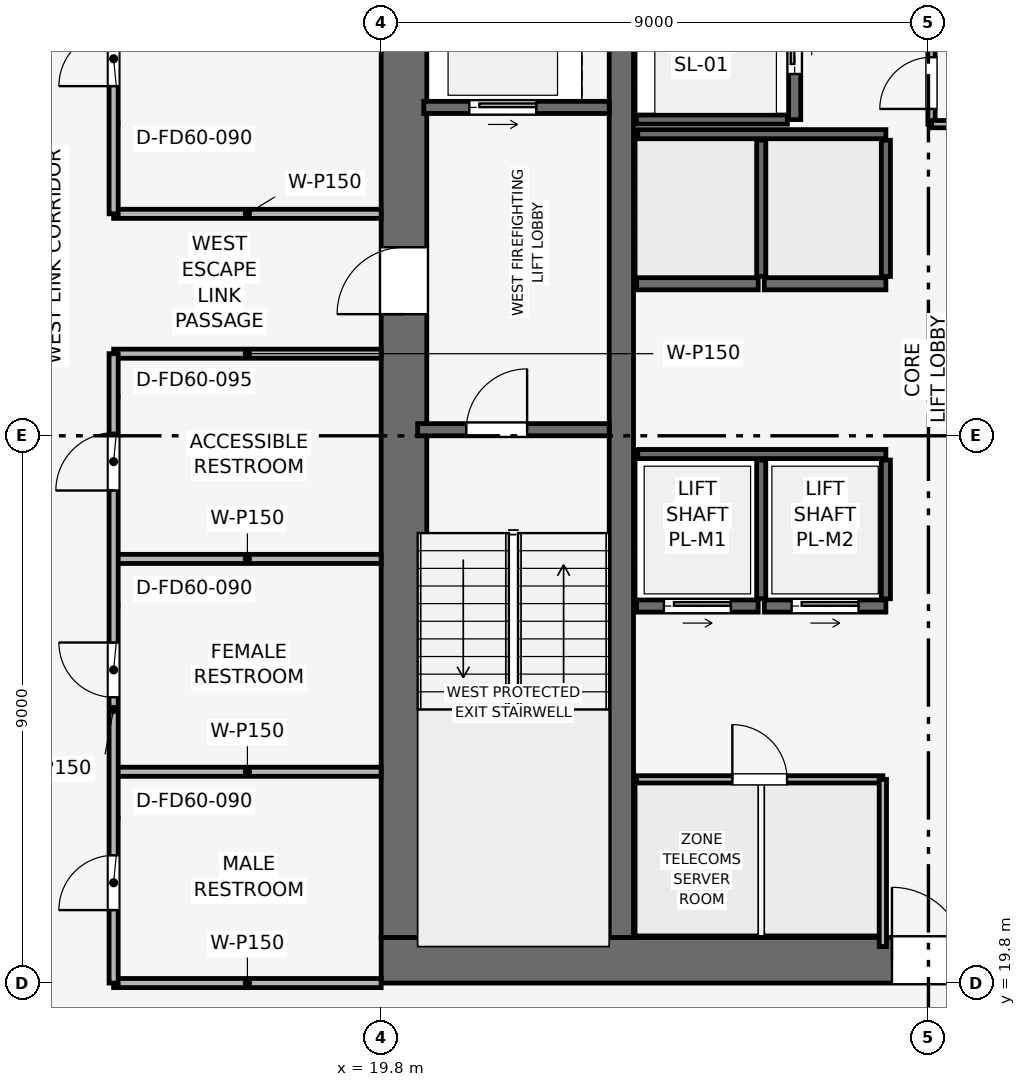
"""IFC4 building model, lengths in metres.
Left out: names, types, materials, properties, quantities, classifications, styles, units other than length and angle.
Written with IfcOpenShell. Run it as: python <this file> out.ifc"""

import sys

from ifc_helpers import new_model, si_unit, direction, frame, frame_2d, origin, place, context, subcontext, project, spatial, rectangle, extrude, element, fill, save


model = new_model("IFC4")
c1 = context("Model", 3, precision=1e-05, world=origin(), true_north=direction((0.0, 1.0)))
c2 = subcontext(c1, "Body", "Model", "MODEL_VIEW")
j1 = project(units=[si_unit("LENGTHUNIT", "METRE"), si_unit("PLANEANGLEUNIT", "RADIAN")], contexts=[c1])
p1 = place(None, origin())
s1 = spatial("IfcSite", under=j1, at=p1, CompositionType="ELEMENT")
p2 = place(p1, origin())
s2 = spatial("IfcBuilding", under=s1, at=p2, CompositionType="ELEMENT")
p3 = place(p2, frame((0.0, 0.0, 211.2)))
s3 = spatial("IfcBuildingStorey", under=s2, at=p3, CompositionType="ELEMENT", Elevation=211.2)
p4 = place(p3, frame((19.8, 20.175, 0.0), z_axis=(0.0, 0.0, 1.0), x_axis=(1.0, 0.0, 0.0)))
e1 = element("IfcWall", 1, at=p4, inside=s3, PredefinedType="SHEAR", context=c2, shape_type="SweptSolid", body=[
    extrude(rectangle(XDim=18.0, YDim=0.75, at=frame_2d((9.0, 0.0))), origin(), (0.0, 0.0, 1.0), 3.75),
])
p5 = place(p4, frame((8.4, 0.0, 0.0)))
e2 = element("IfcOpeningElement", 2, at=p5, cuts=e1, PredefinedType="OPENING", context=c2, shape_type="SweptSolid", body=[
    extrude(rectangle(XDim=1.2, YDim=2.2, at=frame_2d((0.6, 1.1))), frame((0.0, 0.385, 0.0), z_axis=(0.0, -1.0, 0.0), x_axis=(1.0, 0.0, 0.0)), (0.0, 0.0, 1.0), 0.77),
])
p6 = place(p3, frame((20.175, 20.55, 0.0), z_axis=(0.0, 0.0, 1.0), x_axis=(0.0, 1.0, 0.0)))
e3 = element("IfcWall", 3, at=p6, inside=s3, PredefinedType="SHEAR", context=c2, shape_type="SweptSolid", body=[
    extrude(rectangle(XDim=16.5, YDim=0.75, at=frame_2d((8.25, 0.0))), origin(), (0.0, 0.0, 1.0), 3.75),
])
p7 = place(p6, frame((10.25, 0.0, 0.0)))
e4 = element("IfcOpeningElement", 4, at=p7, cuts=e3, PredefinedType="OPENING", context=c2, shape_type="SweptSolid", body=[
    extrude(rectangle(XDim=1.1, YDim=2.15, at=frame_2d((0.55, 1.075))), frame((0.0, 0.385, 0.0), z_axis=(0.0, -1.0, 0.0), x_axis=(1.0, 0.0, 0.0)), (0.0, 0.0, 1.0), 0.77),
])
p8 = place(p3, frame((23.75, 20.55, 0.0), z_axis=(0.0, 0.0, 1.0), x_axis=(0.0, 1.0, 0.0)))
e5 = element("IfcWall", 5, at=p8, inside=s3, PredefinedType="SHEAR", context=c2, shape_type="SweptSolid", body=[
    extrude(rectangle(XDim=16.5, YDim=0.4, at=frame_2d((8.25, 0.0))), origin(), (0.0, 0.0, 1.0), 3.75),
])
p9 = place(p3, frame((20.4, 28.9, 0.0), z_axis=(0.0, 0.0, 1.0), x_axis=(1.0, 0.0, 0.0)))
e6 = element("IfcWall", 6, at=p9, inside=s3, PredefinedType="SHEAR", context=c2, shape_type="SweptSolid", body=[
    extrude(rectangle(XDim=3.15, YDim=0.2, at=frame_2d((1.575, 0.0))), origin(), (0.0, 0.0, 1.0), 3.5),
])
p10 = place(p9, frame((0.8, 0.0, 0.0)))
e7 = element("IfcOpeningElement", 7, at=p10, cuts=e6, PredefinedType="OPENING", context=c2, shape_type="SweptSolid", body=[
    extrude(rectangle(XDim=1.0, YDim=2.1, at=frame_2d((0.5, 1.05))), frame((0.0, 0.11, 0.0), z_axis=(0.0, -1.0, 0.0), x_axis=(1.0, 0.0, 0.0)), (0.0, 0.0, 1.0), 0.22),
])
p11 = place(p3, frame((20.5, 34.2, 0.0), z_axis=(0.0, 0.0, 1.0), x_axis=(1.0, 0.0, 0.0)))
e8 = element("IfcWall", 8, at=p11, inside=s3, PredefinedType="SHEAR", context=c2, shape_type="SweptSolid", body=[
    extrude(rectangle(XDim=3.05, YDim=0.2, at=frame_2d((1.525, 0.0))), origin(), (0.0, 0.0, 1.0), 3.5),
])
p12 = place(p11, frame((0.75, 0.0, 0.0)))
e9 = element("IfcOpeningElement", 9, at=p12, cuts=e8, PredefinedType="OPENING", context=c2, shape_type="SweptSolid", body=[
    extrude(rectangle(XDim=1.1, YDim=2.15, at=frame_2d((0.55, 1.075))), frame((0.0, 0.11, 0.0), z_axis=(0.0, -1.0, 0.0), x_axis=(1.0, 0.0, 0.0)), (0.0, 0.0, 1.0), 0.22),
])
p13 = place(p3, frame((26.6, 34.0, 0.0), z_axis=(0.0, 0.0, 1.0), x_axis=(0.0, 1.0, 0.0)))
e10 = element("IfcWall", 10, at=p13, inside=s3, PredefinedType="SHEAR", context=c2, shape_type="SweptSolid", body=[
    extrude(rectangle(XDim=3.05, YDim=0.2, at=frame_2d((1.525, 0.0))), origin(), (0.0, 0.0, 1.0), 3.5),
])
p14 = place(p13, frame((0.75, 0.0, 0.0)))
e11 = element("IfcOpeningElement", 11, at=p14, cuts=e10, PredefinedType="OPENING", context=c2, shape_type="SweptSolid", body=[
    extrude(rectangle(XDim=1.1, YDim=2.15, at=frame_2d((0.55, 1.075))), frame((0.0, 0.11, 0.0), z_axis=(0.0, -1.0, 0.0), x_axis=(1.0, 0.0, 0.0)), (0.0, 0.0, 1.0), 0.22),
])
p15 = place(p3, frame((24.0, 34.0, 0.0), z_axis=(0.0, 0.0, 1.0), x_axis=(1.0, 0.0, 0.0)))
e12 = element("IfcWall", 12, at=p15, inside=s3, PredefinedType="SHEAR", context=c2, shape_type="SweptSolid", body=[
    extrude(rectangle(XDim=2.48, YDim=0.15, at=frame_2d((1.24, 0.0))), origin(), (0.0, 0.0, 1.0), 3.5),
])
p16 = place(p3, frame((24.0, 26.0, 0.0), z_axis=(0.0, 0.0, 1.0), x_axis=(1.0, 0.0, 0.0)))
e13 = element("IfcWall", 13, at=p16, inside=s3, PredefinedType="SHEAR", context=c2, shape_type="SweptSolid", body=[
    extrude(rectangle(XDim=2.0, YDim=0.2, at=frame_2d((1.0, 0.0))), origin(), (0.0, 0.0, 1.0), 3.5),
])
p17 = place(p16, frame((0.45, 0.0, 0.0)))
e14 = element("IfcOpeningElement", 14, at=p17, cuts=e13, PredefinedType="OPENING", context=c2, shape_type="SweptSolid", body=[
    extrude(rectangle(XDim=1.1, YDim=2.15, at=frame_2d((0.55, 1.075))), frame((0.0, 0.11, 0.0), z_axis=(0.0, -1.0, 0.0), x_axis=(1.0, 0.0, 0.0)), (0.0, 0.0, 1.0), 0.22),
])
p18 = place(p3, frame((26.1, 26.0, 0.0), z_axis=(0.0, 0.0, 1.0), x_axis=(1.0, 0.0, 0.0)))
e15 = element("IfcWall", 15, at=p18, inside=s3, PredefinedType="SHEAR", context=c2, shape_type="SweptSolid", body=[
    extrude(rectangle(XDim=2.0, YDim=0.2, at=frame_2d((1.0, 0.0))), origin(), (0.0, 0.0, 1.0), 3.5),
])
p19 = place(p18, frame((0.45, 0.0, 0.0)))
e16 = element("IfcOpeningElement", 16, at=p19, cuts=e15, PredefinedType="OPENING", context=c2, shape_type="SweptSolid", body=[
    extrude(rectangle(XDim=1.1, YDim=2.15, at=frame_2d((0.55, 1.075))), frame((0.0, 0.11, 0.0), z_axis=(0.0, -1.0, 0.0), x_axis=(1.0, 0.0, 0.0)), (0.0, 0.0, 1.0), 0.22),
])
for number, where, z_axis, x_axis in (
    (17, (24.0, 31.3, 0.0), (0.0, 0.0, 1.0), (1.0, 0.0, 0.0)),
    (18, (26.1, 31.3, 0.0), (0.0, 0.0, 1.0), (1.0, 0.0, 0.0)),
):
    element("IfcWall", number, at=place(p3, frame(where, z_axis=z_axis, x_axis=x_axis)), inside=s3, PredefinedType="SHEAR", context=c2, shape_type="SweptSolid", body=[
        extrude(rectangle(XDim=2.0, YDim=0.2, at=frame_2d((1.0, 0.0))), origin(), (0.0, 0.0, 1.0), 3.5),
    ])
p20 = place(p3, frame((24.02, 28.5, 0.0), z_axis=(0.0, 0.0, 1.0), x_axis=(1.0, 0.0, 0.0)))
e19 = element("IfcWall", 19, at=p20, inside=s3, PredefinedType="SHEAR", context=c2, shape_type="SweptSolid", body=[
    extrude(rectangle(XDim=4.08, YDim=0.15, at=frame_2d((2.04, 0.0))), origin(), (0.0, 0.0, 1.0), 3.5),
])
for number, where, z_axis, x_axis in (
    (20, (26.05, 26.12, 0.0), (0.0, 0.0, 1.0), (0.0, 1.0, 0.0)),
    (21, (28.1, 26.12, 0.0), (0.0, 0.0, 1.0), (0.0, 1.0, 0.0)),
):
    element("IfcWall", number, at=place(p3, frame(where, z_axis=z_axis, x_axis=x_axis)), inside=s3, PredefinedType="SHEAR", context=c2, shape_type="SweptSolid", body=[
        extrude(rectangle(XDim=2.28, YDim=0.15, at=frame_2d((1.14, 0.0))), origin(), (0.0, 0.0, 1.0), 3.5),
    ])
p21 = place(p3, frame((24.02, 33.76, 0.0), z_axis=(0.0, 0.0, 1.0), x_axis=(1.0, 0.0, 0.0)))
e22 = element("IfcWall", 22, at=p21, inside=s3, PredefinedType="SHEAR", context=c2, shape_type="SweptSolid", body=[
    extrude(rectangle(XDim=4.08, YDim=0.15, at=frame_2d((2.04, 0.0))), origin(), (0.0, 0.0, 1.0), 3.5),
])
for number, where, z_axis, x_axis in (
    (23, (26.05, 31.42, 0.0), (0.0, 0.0, 1.0), (0.0, 1.0, 0.0)),
    (24, (28.1, 31.42, 0.0), (0.0, 0.0, 1.0), (0.0, 1.0, 0.0)),
):
    element("IfcWall", number, at=place(p3, frame(where, z_axis=z_axis, x_axis=x_axis)), inside=s3, PredefinedType="SHEAR", context=c2, shape_type="SweptSolid", body=[
        extrude(rectangle(XDim=2.24, YDim=0.15, at=frame_2d((1.12, 0.0))), origin(), (0.0, 0.0, 1.0), 3.5),
    ])
p22 = place(p3, frame((28.85, 33.925, 0.0), z_axis=(0.0, 0.0, 1.0), x_axis=(0.0, 1.0, 0.0)))
e25 = element("IfcWall", 25, at=p22, inside=s3, PredefinedType="PARTITIONING", context=c2, shape_type="SweptSolid", body=[
    extrude(rectangle(XDim=3.125, YDim=0.12, at=frame_2d((1.562, 0.0))), origin(), (0.0, 0.0, 1.0), 3.5),
])
p23 = place(p22, frame((0.25, 0.0, 0.0)))
e26 = element("IfcOpeningElement", 26, at=p23, cuts=e25, PredefinedType="OPENING", context=c2, shape_type="SweptSolid", body=[
    extrude(rectangle(XDim=0.85, YDim=2.1, at=frame_2d((0.425, 1.05))), frame((0.0, 0.07, 0.0), z_axis=(0.0, -1.0, 0.0), x_axis=(1.0, 0.0, 0.0)), (0.0, 0.0, 1.0), 0.14),
])
p24 = place(p22, frame((1.72, 0.0, 0.0)))
e27 = element("IfcOpeningElement", 27, at=p24, cuts=e25, PredefinedType="OPENING", context=c2, shape_type="SweptSolid", body=[
    extrude(rectangle(XDim=0.85, YDim=2.1, at=frame_2d((0.425, 1.05))), frame((0.0, 0.07, 0.0), z_axis=(0.0, -1.0, 0.0), x_axis=(1.0, 0.0, 0.0)), (0.0, 0.0, 1.0), 0.14),
])
p25 = place(p3, frame((28.85, 33.925, 0.0), z_axis=(0.0, 0.0, 1.0), x_axis=(1.0, 0.0, 0.0)))
e28 = element("IfcWall", 28, at=p25, inside=s3, PredefinedType="PARTITIONING", context=c2, shape_type="SweptSolid", body=[
    extrude(rectangle(XDim=3.3, YDim=0.12, at=frame_2d((1.65, 0.0))), origin(), (0.0, 0.0, 1.0), 3.5),
])
p26 = place(p3, frame((24.0, 23.15, 0.0), z_axis=(0.0, 0.0, 1.0), x_axis=(1.0, 0.0, 0.0)))
e29 = element("IfcWall", 29, at=p26, inside=s3, PredefinedType="PARTITIONING", context=c2, shape_type="SweptSolid", body=[
    extrude(rectangle(XDim=4.05, YDim=0.12, at=frame_2d((2.025, 0.0))), origin(), (0.0, 0.0, 1.0), 3.5),
])
p27 = place(p26, frame((1.575, 0.0, 0.0)))
e30 = element("IfcOpeningElement", 30, at=p27, cuts=e29, PredefinedType="OPENING", context=c2, shape_type="SweptSolid", body=[
    extrude(rectangle(XDim=0.9, YDim=2.1, at=frame_2d((0.45, 1.05))), frame((0.0, 0.07, 0.0), z_axis=(0.0, -1.0, 0.0), x_axis=(1.0, 0.0, 0.0)), (0.0, 0.0, 1.0), 0.14),
])
p28 = place(p3, frame((28.05, 20.4, 0.0), z_axis=(0.0, 0.0, 1.0), x_axis=(0.0, 1.0, 0.0)))
e31 = element("IfcWall", 31, at=p28, inside=s3, PredefinedType="PARTITIONING", context=c2, shape_type="SweptSolid", body=[
    extrude(rectangle(XDim=2.75, YDim=0.12, at=frame_2d((1.375, 0.0))), origin(), (0.0, 0.0, 1.0), 3.5),
])
p29 = place(p3, frame((15.4, 19.8, 0.0), z_axis=(0.0, 0.0, 1.0), x_axis=(1.0, 0.0, 0.0)))
e32 = element("IfcWall", 32, at=p29, inside=s3, PredefinedType="PARTITIONING", context=c2, shape_type="SweptSolid", body=[
    extrude(rectangle(XDim=4.4, YDim=0.15, at=frame_2d((2.2, 0.0))), origin(), (0.0, 0.0, 1.0), 3.035),
])
for number, where, z_axis, x_axis in (
    (33, (15.4, 23.275, 0.0), (0.0, 0.0, 1.0), (1.0, 0.0, 0.0)),
    (34, (15.4, 26.775, 0.0), (0.0, 0.0, 1.0), (1.0, 0.0, 0.0)),
    (35, (15.4, 30.15, 0.0), (0.0, 0.0, 1.0), (1.0, 0.0, 0.0)),
    (36, (15.4, 32.45, 0.0), (0.0, 0.0, 1.0), (1.0, 0.0, 0.0)),
):
    element("IfcWall", number, at=place(p3, frame(where, z_axis=z_axis, x_axis=x_axis)), inside=s3, PredefinedType="PARTITIONING", context=c2, shape_type="SweptSolid", body=[
        extrude(rectangle(XDim=4.4, YDim=0.15, at=frame_2d((2.2, 0.0))), origin(), (0.0, 0.0, 1.0), 3.5),
    ])
p30 = place(p3, frame((15.4, 19.8, 0.0), z_axis=(0.0, 0.0, 1.0), x_axis=(0.0, 1.0, 0.0)))
e37 = element("IfcWall", 37, at=p30, inside=s3, PredefinedType="PARTITIONING", context=c2, shape_type="SweptSolid", body=[
    extrude(rectangle(XDim=10.35, YDim=0.15, at=frame_2d((5.175, 0.0))), origin(), (0.0, 0.0, 1.0), 3.035),
])
p31 = place(p30, frame((1.2, 0.0, 0.0)))
e38 = element("IfcOpeningElement", 38, at=p31, cuts=e37, PredefinedType="OPENING", context=c2, shape_type="SweptSolid", body=[
    extrude(rectangle(XDim=0.9, YDim=2.1, at=frame_2d((0.45, 1.05))), frame((0.0, 0.085, 0.0), z_axis=(0.0, -1.0, 0.0), x_axis=(1.0, 0.0, 0.0)), (0.0, 0.0, 1.0), 0.17),
])
p32 = place(p30, frame((4.7, 0.0, 0.0)))
e39 = element("IfcOpeningElement", 39, at=p32, cuts=e37, PredefinedType="OPENING", context=c2, shape_type="SweptSolid", body=[
    extrude(rectangle(XDim=0.9, YDim=2.1, at=frame_2d((0.45, 1.05))), frame((0.0, 0.085, 0.0), z_axis=(0.0, -1.0, 0.0), x_axis=(1.0, 0.0, 0.0)), (0.0, 0.0, 1.0), 0.17),
])
p33 = place(p30, frame((8.1, 0.0, 0.0)))
e40 = element("IfcOpeningElement", 40, at=p33, cuts=e37, PredefinedType="OPENING", context=c2, shape_type="SweptSolid", body=[
    extrude(rectangle(XDim=0.95, YDim=2.1, at=frame_2d((0.475, 1.05))), frame((0.0, 0.085, 0.0), z_axis=(0.0, -1.0, 0.0), x_axis=(1.0, 0.0, 0.0)), (0.0, 0.0, 1.0), 0.17),
])
p34 = place(p3, frame((15.4, 32.45, 0.0), z_axis=(0.0, 0.0, 1.0), x_axis=(0.0, 1.0, 0.0)))
e41 = element("IfcWall", 41, at=p34, inside=s3, PredefinedType="PARTITIONING", context=c2, shape_type="SweptSolid", body=[
    extrude(rectangle(XDim=5.35, YDim=0.15, at=frame_2d((2.675, 0.0))), origin(), (0.0, 0.0, 1.0), 3.035),
])
p35 = place(p34, frame((2.1, 0.0, 0.0)))
e42 = element("IfcOpeningElement", 42, at=p35, cuts=e41, PredefinedType="OPENING", context=c2, shape_type="SweptSolid", body=[
    extrude(rectangle(XDim=0.9, YDim=2.1, at=frame_2d((0.45, 1.05))), frame((0.0, 0.085, 0.0), z_axis=(0.0, -1.0, 0.0), x_axis=(1.0, 0.0, 0.0)), (0.0, 0.0, 1.0), 0.17),
])
p36 = place(p10, origin())
e43 = element("IfcDoor", 43, at=p36, inside=s3, OperationType="SINGLE_SWING_RIGHT", PredefinedType="DOOR", context=c2, shape_type="SweptSolid", body=[
    extrude(rectangle(XDim=1.0, YDim=2.1, at=frame_2d((0.5, 1.05))), frame((0.0, 0.025, 0.0), z_axis=(0.0, -1.0, 0.0), x_axis=(1.0, 0.0, 0.0)), (0.0, 0.0, 1.0), 0.05),
])
fill(e7, e43)
p37 = place(p12, origin())
e44 = element("IfcDoor", 44, at=p37, inside=s3, OperationType="SLIDING_TO_RIGHT", PredefinedType="DOOR", context=c2, shape_type="SweptSolid", body=[
    extrude(rectangle(XDim=1.1, YDim=2.15, at=frame_2d((0.55, 1.075))), frame((0.0, 0.025, 0.0), z_axis=(0.0, -1.0, 0.0), x_axis=(1.0, 0.0, 0.0)), (0.0, 0.0, 1.0), 0.05),
])
fill(e9, e44)
p38 = place(p14, origin())
e45 = element("IfcDoor", 45, at=p38, inside=s3, OperationType="SLIDING_TO_RIGHT", PredefinedType="DOOR", context=c2, shape_type="SweptSolid", body=[
    extrude(rectangle(XDim=1.1, YDim=2.15, at=frame_2d((0.55, 1.075))), frame((0.0, 0.025, 0.0), z_axis=(0.0, -1.0, 0.0), x_axis=(1.0, 0.0, 0.0)), (0.0, 0.0, 1.0), 0.05),
])
fill(e11, e45)
p39 = place(p17, origin())
e46 = element("IfcDoor", 46, at=p39, inside=s3, OperationType="SLIDING_TO_RIGHT", PredefinedType="DOOR", context=c2, shape_type="SweptSolid", body=[
    extrude(rectangle(XDim=1.1, YDim=2.15, at=frame_2d((0.55, 1.075))), frame((0.0, 0.025, 0.0), z_axis=(0.0, -1.0, 0.0), x_axis=(1.0, 0.0, 0.0)), (0.0, 0.0, 1.0), 0.05),
])
fill(e14, e46)
p40 = place(p19, origin())
e47 = element("IfcDoor", 47, at=p40, inside=s3, OperationType="SLIDING_TO_RIGHT", PredefinedType="DOOR", context=c2, shape_type="SweptSolid", body=[
    extrude(rectangle(XDim=1.1, YDim=2.15, at=frame_2d((0.55, 1.075))), frame((0.0, 0.025, 0.0), z_axis=(0.0, -1.0, 0.0), x_axis=(1.0, 0.0, 0.0)), (0.0, 0.0, 1.0), 0.05),
])
fill(e16, e47)
p41 = place(p23, origin())
e48 = element("IfcDoor", 48, at=p41, inside=s3, OperationType="SINGLE_SWING_LEFT", PredefinedType="DOOR", context=c2, shape_type="SweptSolid", body=[
    extrude(rectangle(XDim=0.85, YDim=2.1, at=frame_2d((0.425, 1.05))), frame((0.0, 0.025, 0.0), z_axis=(0.0, -1.0, 0.0), x_axis=(1.0, 0.0, 0.0)), (0.0, 0.0, 1.0), 0.05),
])
fill(e26, e48)
p42 = place(p27, origin())
e49 = element("IfcDoor", 49, at=p42, inside=s3, OperationType="SINGLE_SWING_LEFT", PredefinedType="DOOR", context=c2, shape_type="SweptSolid", body=[
    extrude(rectangle(XDim=0.9, YDim=2.1, at=frame_2d((0.45, 1.05))), frame((0.0, 0.025, 0.0), z_axis=(0.0, -1.0, 0.0), x_axis=(1.0, 0.0, 0.0)), (0.0, 0.0, 1.0), 0.05),
])
fill(e30, e49)
p43 = place(p31, origin())
e50 = element("IfcDoor", 50, at=p43, inside=s3, OperationType="SINGLE_SWING_LEFT", PredefinedType="DOOR", context=c2, shape_type="SweptSolid", body=[
    extrude(rectangle(XDim=0.9, YDim=2.1, at=frame_2d((0.45, 1.05))), frame((0.0, 0.025, 0.0), z_axis=(0.0, -1.0, 0.0), x_axis=(1.0, 0.0, 0.0)), (0.0, 0.0, 1.0), 0.05),
])
fill(e38, e50)
p44 = place(p32, origin())
e51 = element("IfcDoor", 51, at=p44, inside=s3, OperationType="SINGLE_SWING_RIGHT", PredefinedType="DOOR", context=c2, shape_type="SweptSolid", body=[
    extrude(rectangle(XDim=0.9, YDim=2.1, at=frame_2d((0.45, 1.05))), frame((0.0, 0.025, 0.0), z_axis=(0.0, -1.0, 0.0), x_axis=(1.0, 0.0, 0.0)), (0.0, 0.0, 1.0), 0.05),
])
fill(e39, e51)
p45 = place(p33, origin())
e52 = element("IfcDoor", 52, at=p45, inside=s3, OperationType="SINGLE_SWING_LEFT", PredefinedType="DOOR", context=c2, shape_type="SweptSolid", body=[
    extrude(rectangle(XDim=0.95, YDim=2.1, at=frame_2d((0.475, 1.05))), frame((0.0, 0.025, 0.0), z_axis=(0.0, -1.0, 0.0), x_axis=(1.0, 0.0, 0.0)), (0.0, 0.0, 1.0), 0.05),
])
fill(e40, e52)
p46 = place(p35, origin())
e53 = element("IfcDoor", 53, at=p46, inside=s3, OperationType="SINGLE_SWING_LEFT", PredefinedType="DOOR", context=c2, shape_type="SweptSolid", body=[
    extrude(rectangle(XDim=0.9, YDim=2.1, at=frame_2d((0.45, 1.05))), frame((0.0, 0.025, 0.0), z_axis=(0.0, -1.0, 0.0), x_axis=(1.0, 0.0, 0.0)), (0.0, 0.0, 1.0), 0.05),
])
fill(e42, e53)
p47 = place(p7, origin())
e54 = element("IfcDoor", 54, at=p47, inside=s3, OperationType="SINGLE_SWING_LEFT", PredefinedType="DOOR", context=c2, shape_type="SweptSolid", body=[
    extrude(rectangle(XDim=1.1, YDim=2.15, at=frame_2d((0.55, 1.075))), frame((0.0, 0.025, 0.0), z_axis=(0.0, -1.0, 0.0), x_axis=(1.0, 0.0, 0.0)), (0.0, 0.0, 1.0), 0.05),
])
fill(e4, e54)
p48 = place(p5, origin())
e55 = element("IfcDoor", 55, at=p48, inside=s3, OperationType="SINGLE_SWING_LEFT", PredefinedType="DOOR", context=c2, shape_type="SweptSolid", body=[
    extrude(rectangle(XDim=1.2, YDim=2.2, at=frame_2d((0.6, 1.1))), frame((0.0, 0.025, 0.0), z_axis=(0.0, -1.0, 0.0), x_axis=(1.0, 0.0, 0.0)), (0.0, 0.0, 1.0), 0.05),
])
fill(e2, e55)
save(model, sys.argv[1])
